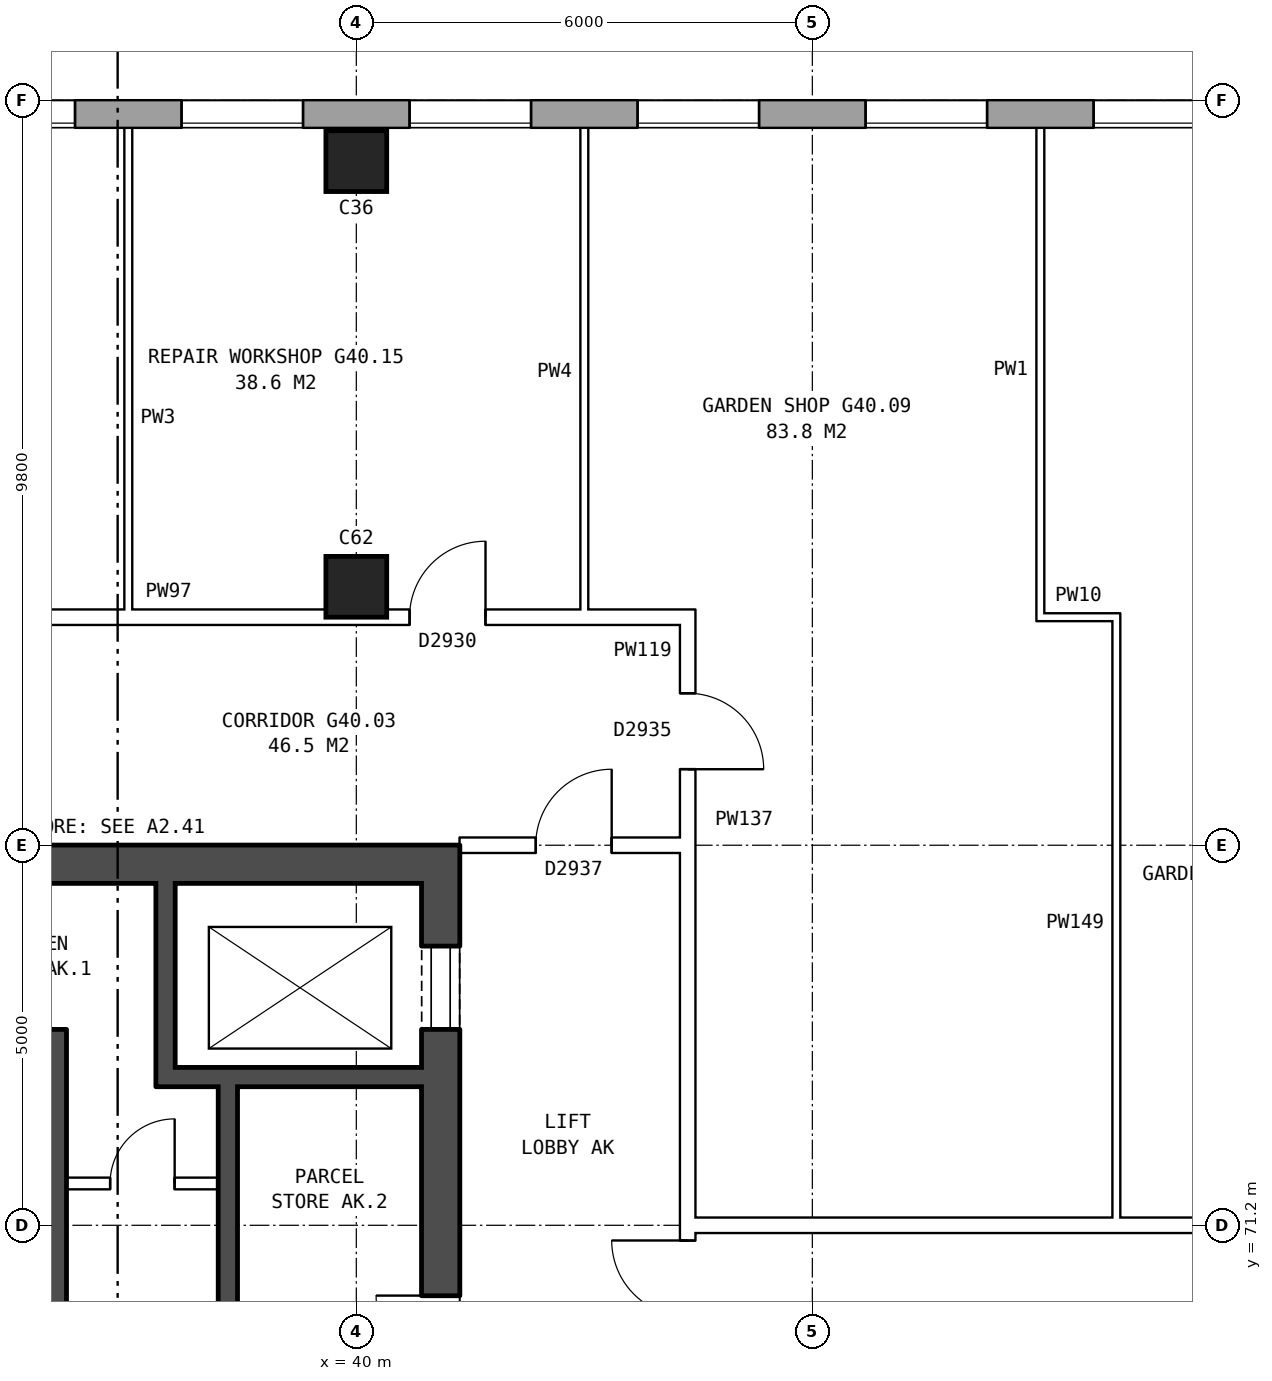
"""IFC4 building model, lengths in metres.
Left out: names, types, materials, properties, quantities, classifications, styles, units other than length and angle.
Written with IfcOpenShell. Run it as: python <this file> out.ifc"""

import sys

from ifc_helpers import new_model, si_unit, direction, frame, frame_2d, origin, origin_2d, place, context, subcontext, project, spatial, rectangle, extrude, element, fill, save


model = new_model("IFC4")
c1 = context("Model", 3, precision=1e-05, world=origin(), true_north=direction((0.0, 1.0)))
c2 = subcontext(c1, "Body", "Model", "MODEL_VIEW")
j1 = project(units=[si_unit("LENGTHUNIT", "METRE"), si_unit("PLANEANGLEUNIT", "RADIAN")], contexts=[c1])
p1 = place(None, origin())
s1 = spatial("IfcSite", under=j1, at=p1, CompositionType="ELEMENT")
p2 = place(p1, origin())
s2 = spatial("IfcBuilding", under=s1, at=p2, CompositionType="ELEMENT")
p3 = place(p2, frame((0.0, 0.0, 142.3)))
s3 = spatial("IfcBuildingStorey", under=s2, at=p3, CompositionType="ELEMENT", Elevation=142.3)
for number, where, z_axis, x_axis in (
    (1, (40.0, 79.6, 0.0), (0.0, 0.0, 1.0), (1.0, 0.0, 0.0)),
    (2, (40.0, 85.2, 0.0), (0.0, 0.0, 1.0), (1.0, 0.0, 0.0)),
):
    element("IfcColumn", number, at=place(p3, frame(where, z_axis=z_axis, x_axis=x_axis)), inside=s3, PredefinedType="COLUMN", context=c2, shape_type="SweptSolid", body=[
        extrude(rectangle(XDim=0.8, YDim=0.8, at=origin_2d()), origin(), (0.0, 0.0, 1.0), 5.6),
    ])
p4 = place(p3, frame((72.925, 85.82, 0.0), z_axis=(0.0, 0.0, 1.0), x_axis=(-1.0, 0.0, 0.0)))
e3 = element("IfcWall", 3, at=p4, inside=s3, PredefinedType="STANDARD", context=c2, shape_type="SweptSolid", body=[
    extrude(rectangle(XDim=41.351, YDim=0.36, at=frame_2d((20.675, 0.0))), origin(), (0.0, 0.0, 1.0), 5.6),
])
p5 = place(p4, frame((0.625, 0.0, 0.15)))
e4 = element("IfcOpeningElement", 4, at=p5, cuts=e3, PredefinedType="OPENING", context=c2, shape_type="SweptSolid", body=[
    extrude(rectangle(XDim=1.6, YDim=2.4, at=frame_2d((0.8, 1.2))), frame((0.0, 0.19, 0.0), z_axis=(0.0, -1.0, 0.0), x_axis=(1.0, 0.0, 0.0)), (0.0, 0.0, 1.0), 0.38),
])
p6 = place(p4, frame((3.625, 0.0, 0.15)))
e5 = element("IfcOpeningElement", 5, at=p6, cuts=e3, PredefinedType="OPENING", context=c2, shape_type="SweptSolid", body=[
    extrude(rectangle(XDim=1.6, YDim=2.4, at=frame_2d((0.8, 1.2))), frame((0.0, 0.19, 0.0), z_axis=(0.0, -1.0, 0.0), x_axis=(1.0, 0.0, 0.0)), (0.0, 0.0, 1.0), 0.38),
])
p7 = place(p4, frame((6.625, 0.0, 0.15)))
e6 = element("IfcOpeningElement", 6, at=p7, cuts=e3, PredefinedType="OPENING", context=c2, shape_type="SweptSolid", body=[
    extrude(rectangle(XDim=1.6, YDim=2.4, at=frame_2d((0.8, 1.2))), frame((0.0, 0.19, 0.0), z_axis=(0.0, -1.0, 0.0), x_axis=(1.0, 0.0, 0.0)), (0.0, 0.0, 1.0), 0.38),
])
p8 = place(p4, frame((9.625, 0.0, 0.15)))
e7 = element("IfcOpeningElement", 7, at=p8, cuts=e3, PredefinedType="OPENING", context=c2, shape_type="SweptSolid", body=[
    extrude(rectangle(XDim=1.6, YDim=2.4, at=frame_2d((0.8, 1.2))), frame((0.0, 0.19, 0.0), z_axis=(0.0, -1.0, 0.0), x_axis=(1.0, 0.0, 0.0)), (0.0, 0.0, 1.0), 0.38),
])
p9 = place(p4, frame((12.625, 0.0, 0.15)))
e8 = element("IfcOpeningElement", 8, at=p9, cuts=e3, PredefinedType="OPENING", context=c2, shape_type="SweptSolid", body=[
    extrude(rectangle(XDim=1.6, YDim=2.4, at=frame_2d((0.8, 1.2))), frame((0.0, 0.19, 0.0), z_axis=(0.0, -1.0, 0.0), x_axis=(1.0, 0.0, 0.0)), (0.0, 0.0, 1.0), 0.38),
])
p10 = place(p4, frame((15.625, 0.0, 0.15)))
e9 = element("IfcOpeningElement", 9, at=p10, cuts=e3, PredefinedType="OPENING", context=c2, shape_type="SweptSolid", body=[
    extrude(rectangle(XDim=1.6, YDim=2.4, at=frame_2d((0.8, 1.2))), frame((0.0, 0.19, 0.0), z_axis=(0.0, -1.0, 0.0), x_axis=(1.0, 0.0, 0.0)), (0.0, 0.0, 1.0), 0.38),
])
p11 = place(p4, frame((18.625, 0.0, 0.15)))
e10 = element("IfcOpeningElement", 10, at=p11, cuts=e3, PredefinedType="OPENING", context=c2, shape_type="SweptSolid", body=[
    extrude(rectangle(XDim=1.6, YDim=2.4, at=frame_2d((0.8, 1.2))), frame((0.0, 0.19, 0.0), z_axis=(0.0, -1.0, 0.0), x_axis=(1.0, 0.0, 0.0)), (0.0, 0.0, 1.0), 0.38),
])
p12 = place(p4, frame((21.625, 0.0, 0.15)))
e11 = element("IfcOpeningElement", 11, at=p12, cuts=e3, PredefinedType="OPENING", context=c2, shape_type="SweptSolid", body=[
    extrude(rectangle(XDim=1.6, YDim=2.4, at=frame_2d((0.8, 1.2))), frame((0.0, 0.19, 0.0), z_axis=(0.0, -1.0, 0.0), x_axis=(1.0, 0.0, 0.0)), (0.0, 0.0, 1.0), 0.38),
])
p13 = place(p4, frame((24.625, 0.0, 0.15)))
e12 = element("IfcOpeningElement", 12, at=p13, cuts=e3, PredefinedType="OPENING", context=c2, shape_type="SweptSolid", body=[
    extrude(rectangle(XDim=1.6, YDim=2.4, at=frame_2d((0.8, 1.2))), frame((0.0, 0.19, 0.0), z_axis=(0.0, -1.0, 0.0), x_axis=(1.0, 0.0, 0.0)), (0.0, 0.0, 1.0), 0.38),
])
p14 = place(p4, frame((27.625, 0.0, 0.15)))
e13 = element("IfcOpeningElement", 13, at=p14, cuts=e3, PredefinedType="OPENING", context=c2, shape_type="SweptSolid", body=[
    extrude(rectangle(XDim=1.6, YDim=2.4, at=frame_2d((0.8, 1.2))), frame((0.0, 0.19, 0.0), z_axis=(0.0, -1.0, 0.0), x_axis=(1.0, 0.0, 0.0)), (0.0, 0.0, 1.0), 0.38),
])
p15 = place(p4, frame((30.625, 0.0, 0.15)))
e14 = element("IfcOpeningElement", 14, at=p15, cuts=e3, PredefinedType="OPENING", context=c2, shape_type="SweptSolid", body=[
    extrude(rectangle(XDim=1.6, YDim=2.4, at=frame_2d((0.8, 1.2))), frame((0.0, 0.19, 0.0), z_axis=(0.0, -1.0, 0.0), x_axis=(1.0, 0.0, 0.0)), (0.0, 0.0, 1.0), 0.38),
])
p16 = place(p4, frame((33.625, 0.0, 0.15)))
e15 = element("IfcOpeningElement", 15, at=p16, cuts=e3, PredefinedType="OPENING", context=c2, shape_type="SweptSolid", body=[
    extrude(rectangle(XDim=1.6, YDim=2.4, at=frame_2d((0.8, 1.2))), frame((0.0, 0.19, 0.0), z_axis=(0.0, -1.0, 0.0), x_axis=(1.0, 0.0, 0.0)), (0.0, 0.0, 1.0), 0.38),
])
p17 = place(p4, frame((36.625, 0.0, 0.15)))
e16 = element("IfcOpeningElement", 16, at=p17, cuts=e3, PredefinedType="OPENING", context=c2, shape_type="SweptSolid", body=[
    extrude(rectangle(XDim=1.6, YDim=2.4, at=frame_2d((0.8, 1.2))), frame((0.0, 0.19, 0.0), z_axis=(0.0, -1.0, 0.0), x_axis=(1.0, 0.0, 0.0)), (0.0, 0.0, 1.0), 0.38),
])
p18 = place(p3, frame((41.11, 76.2, 0.0), z_axis=(0.0, 0.0, 1.0), x_axis=(0.0, -1.0, 0.0)))
e17 = element("IfcWall", 17, at=p18, inside=s3, PredefinedType="SHEAR", context=c2, shape_type="SweptSolid", body=[
    extrude(rectangle(XDim=12.4, YDim=0.5, at=frame_2d((6.2, 0.0))), origin(), (0.0, 0.0, 1.0), 5.6),
])
p19 = place(p18, frame((1.325, 0.0, 0.0)))
e18 = element("IfcOpeningElement", 18, at=p19, cuts=e17, PredefinedType="OPENING", context=c2, shape_type="SweptSolid", body=[
    extrude(rectangle(XDim=1.1, YDim=2.1, at=frame_2d((0.55, 1.05))), frame((0.0, 0.26, 0.0), z_axis=(0.0, -1.0, 0.0), x_axis=(1.0, 0.0, 0.0)), (0.0, 0.0, 1.0), 0.52),
])
p20 = place(p18, frame((5.925, 0.0, 0.0)))
e19 = element("IfcOpeningElement", 19, at=p20, cuts=e17, PredefinedType="OPENING", context=c2, shape_type="SweptSolid", body=[
    extrude(rectangle(XDim=0.85, YDim=2.1, at=frame_2d((0.425, 1.05))), frame((0.0, 0.26, 0.0), z_axis=(0.0, -1.0, 0.0), x_axis=(1.0, 0.0, 0.0)), (0.0, 0.0, 1.0), 0.52),
])
p21 = place(p18, frame((9.9, 0.0, 0.0)))
e20 = element("IfcOpeningElement", 20, at=p21, cuts=e17, PredefinedType="OPENING", context=c2, shape_type="SweptSolid", body=[
    extrude(rectangle(XDim=1.1, YDim=2.1, at=frame_2d((0.55, 1.05))), frame((0.0, 0.26, 0.0), z_axis=(0.0, -1.0, 0.0), x_axis=(1.0, 0.0, 0.0)), (0.0, 0.0, 1.0), 0.52),
])
p22 = place(p3, frame((40.86, 75.95, 0.0), z_axis=(0.0, 0.0, 1.0), x_axis=(-1.0, 0.0, 0.0)))
e21 = element("IfcWall", 21, at=p22, inside=s3, PredefinedType="SHEAR", context=c2, shape_type="SweptSolid", body=[
    extrude(rectangle(XDim=8.0, YDim=0.5, at=frame_2d((4.0, 0.0))), origin(), (0.0, 0.0, 1.0), 5.6),
])
p23 = place(p3, frame((40.86, 73.15, 0.0), z_axis=(0.0, 0.0, 1.0), x_axis=(-1.0, 0.0, 0.0)))
e22 = element("IfcWall", 22, at=p23, inside=s3, PredefinedType="SHEAR", context=c2, shape_type="SweptSolid", body=[
    extrude(rectangle(XDim=3.495, YDim=0.25, at=frame_2d((1.748, 0.0))), origin(), (0.0, 0.0, 1.0), 5.6),
])
p24 = place(p3, frame((38.185, 71.75, 0.0), z_axis=(0.0, 0.0, 1.0), x_axis=(-1.0, 0.0, 0.0)))
e23 = element("IfcWall", 23, at=p24, inside=s3, PredefinedType="PARTITIONING", context=c2, shape_type="SweptSolid", body=[
    extrude(rectangle(XDim=2.0, YDim=0.15, at=frame_2d((1.0, 0.0))), origin(), (0.0, 0.0, 1.0), 5.6),
])
p25 = place(p24, frame((0.575, 0.0, 0.0)))
e24 = element("IfcOpeningElement", 24, at=p25, cuts=e23, PredefinedType="OPENING", context=c2, shape_type="SweptSolid", body=[
    extrude(rectangle(XDim=0.85, YDim=2.1, at=frame_2d((0.425, 1.05))), frame((0.0, 0.085, 0.0), z_axis=(0.0, -1.0, 0.0), x_axis=(1.0, 0.0, 0.0)), (0.0, 0.0, 1.0), 0.17),
])
p26 = place(p3, frame((38.31, 73.025, 0.0), z_axis=(0.0, 0.0, 1.0), x_axis=(0.0, -1.0, 0.0)))
e25 = element("IfcWall", 25, at=p26, inside=s3, PredefinedType="SHEAR", context=c2, shape_type="SweptSolid", body=[
    extrude(rectangle(XDim=6.6, YDim=0.25, at=frame_2d((3.3, 0.0))), origin(), (0.0, 0.0, 1.0), 5.6),
])
p27 = place(p3, frame((37.49, 75.7, 0.0), z_axis=(0.0, 0.0, 1.0), x_axis=(0.0, -1.0, 0.0)))
e26 = element("IfcWall", 26, at=p27, inside=s3, PredefinedType="SHEAR", context=c2, shape_type="SweptSolid", body=[
    extrude(rectangle(XDim=2.425, YDim=0.25, at=frame_2d((1.212, 0.0))), origin(), (0.0, 0.0, 1.0), 5.6),
])
p28 = place(p3, frame((36.06, 73.775, 0.0), z_axis=(0.0, 0.0, 1.0), x_axis=(0.0, -1.0, 0.0)))
e27 = element("IfcWall", 27, at=p28, inside=s3, PredefinedType="SHEAR", context=c2, shape_type="SweptSolid", body=[
    extrude(rectangle(XDim=7.35, YDim=0.25, at=frame_2d((3.675, 0.0))), origin(), (0.0, 0.0, 1.0), 5.6),
])
p29 = place(p3, frame((44.36, 63.9, 0.0), z_axis=(0.0, 0.0, 1.0), x_axis=(0.0, 1.0, 0.0)))
e28 = element("IfcWall", 28, at=p29, inside=s3, PredefinedType="PARTITIONING", context=c2, shape_type="SweptSolid", body=[
    extrude(rectangle(XDim=12.2, YDim=0.2, at=frame_2d((6.1, 0.0))), origin(), (0.0, 0.0, 1.0), 5.6),
])
p30 = place(p29, frame((5.1, 0.0, 0.0)))
e29 = element("IfcOpeningElement", 29, at=p30, cuts=e28, PredefinedType="OPENING", context=c2, shape_type="SweptSolid", body=[
    extrude(rectangle(XDim=2.0, YDim=2.1, at=frame_2d((1.0, 1.05))), frame((0.0, 0.11, 0.0), z_axis=(0.0, -1.0, 0.0), x_axis=(1.0, 0.0, 0.0)), (0.0, 0.0, 1.0), 0.22),
])
p31 = place(p3, frame((44.36, 71.2, 0.0), z_axis=(0.0, 0.0, 1.0), x_axis=(1.0, 0.0, 0.0)))
e30 = element("IfcWall", 30, at=p31, inside=s3, PredefinedType="PARTITIONING", context=c2, shape_type="SweptSolid", body=[
    extrude(rectangle(XDim=19.28, YDim=0.2, at=frame_2d((9.64, 0.0))), origin(), (0.0, 0.0, 1.0), 5.6),
])
p32 = place(p31, frame((8.64, 0.0, 0.0)))
e31 = element("IfcOpeningElement", 31, at=p32, cuts=e30, PredefinedType="OPENING", context=c2, shape_type="SweptSolid", body=[
    extrude(rectangle(XDim=1.0, YDim=2.1, at=frame_2d((0.5, 1.05))), frame((0.0, 0.11, 0.0), z_axis=(0.0, -1.0, 0.0), x_axis=(1.0, 0.0, 0.0)), (0.0, 0.0, 1.0), 0.22),
])
p33 = place(p3, frame((41.36, 76.2, 0.0), z_axis=(0.0, 0.0, 1.0), x_axis=(1.0, 0.0, 0.0)))
e32 = element("IfcWall", 32, at=p33, inside=s3, PredefinedType="PARTITIONING", context=c2, shape_type="SweptSolid", body=[
    extrude(rectangle(XDim=3.1, YDim=0.2, at=frame_2d((1.55, 0.0))), origin(), (0.0, 0.0, 1.0), 5.6),
])
p34 = place(p33, frame((1.0, 0.0, 0.0)))
e33 = element("IfcOpeningElement", 33, at=p34, cuts=e32, PredefinedType="OPENING", context=c2, shape_type="SweptSolid", body=[
    extrude(rectangle(XDim=1.0, YDim=2.1, at=frame_2d((0.5, 1.05))), frame((0.0, 0.11, 0.0), z_axis=(0.0, -1.0, 0.0), x_axis=(1.0, 0.0, 0.0)), (0.0, 0.0, 1.0), 0.22),
])
p35 = place(p3, frame((28.74, 79.2, 0.0), z_axis=(0.0, 0.0, 1.0), x_axis=(1.0, 0.0, 0.0)))
e34 = element("IfcWall", 34, at=p35, inside=s3, PredefinedType="PARTITIONING", context=c2, shape_type="SweptSolid", body=[
    extrude(rectangle(XDim=15.72, YDim=0.2, at=frame_2d((7.86, 0.0))), origin(), (0.0, 0.0, 1.0), 5.6),
])
p36 = place(p35, frame((3.69, 0.0, 0.0)))
e35 = element("IfcOpeningElement", 35, at=p36, cuts=e34, PredefinedType="OPENING", context=c2, shape_type="SweptSolid", body=[
    extrude(rectangle(XDim=1.0, YDim=2.1, at=frame_2d((0.5, 1.05))), frame((0.0, 0.11, 0.0), z_axis=(0.0, -1.0, 0.0), x_axis=(1.0, 0.0, 0.0)), (0.0, 0.0, 1.0), 0.22),
])
p37 = place(p35, frame((11.96, 0.0, 0.0)))
e36 = element("IfcOpeningElement", 36, at=p37, cuts=e34, PredefinedType="OPENING", context=c2, shape_type="SweptSolid", body=[
    extrude(rectangle(XDim=1.0, YDim=2.1, at=frame_2d((0.5, 1.05))), frame((0.0, 0.11, 0.0), z_axis=(0.0, -1.0, 0.0), x_axis=(1.0, 0.0, 0.0)), (0.0, 0.0, 1.0), 0.22),
])
p38 = place(p3, frame((48.95, 79.2, 0.0), z_axis=(0.0, 0.0, 1.0), x_axis=(1.0, 0.0, 0.0)))
e37 = element("IfcWall", 37, at=p38, inside=s3, PredefinedType="PARTITIONING", context=c2, shape_type="SweptSolid", body=[
    extrude(rectangle(XDim=1.1, YDim=0.1, at=frame_2d((0.55, 0.0))), origin(), (0.0, 0.0, 1.0), 5.6),
])
for number, where, z_axis, x_axis in (
    (38, (37.0, 79.1, 0.0), (0.0, 0.0, 1.0), (0.0, 1.0, 0.0)),
    (39, (43.0, 79.1, 0.0), (0.0, 0.0, 1.0), (0.0, 1.0, 0.0)),
):
    element("IfcWall", number, at=place(p3, frame(where, z_axis=z_axis, x_axis=x_axis)), inside=s3, PredefinedType="PARTITIONING", context=c2, shape_type="SweptSolid", body=[
        extrude(rectangle(XDim=6.66, YDim=0.1, at=frame_2d((3.33, 0.0))), origin(), (0.0, 0.0, 1.0), 5.6),
    ])
p39 = place(p3, frame((44.36, 76.1, 0.0), z_axis=(0.0, 0.0, 1.0), x_axis=(0.0, 1.0, 0.0)))
e40 = element("IfcWall", 40, at=p39, inside=s3, PredefinedType="PARTITIONING", context=c2, shape_type="SweptSolid", body=[
    extrude(rectangle(XDim=3.2, YDim=0.2, at=frame_2d((1.6, 0.0))), origin(), (0.0, 0.0, 1.0), 5.6),
])
p40 = place(p39, frame((1.1, 0.0, 0.0)))
e41 = element("IfcOpeningElement", 41, at=p40, cuts=e40, PredefinedType="OPENING", context=c2, shape_type="SweptSolid", body=[
    extrude(rectangle(XDim=1.0, YDim=2.1, at=frame_2d((0.5, 1.05))), frame((0.0, 0.11, 0.0), z_axis=(0.0, -1.0, 0.0), x_axis=(1.0, 0.0, 0.0)), (0.0, 0.0, 1.0), 0.22),
])
p41 = place(p3, frame((49.0, 79.15, 0.0), z_axis=(0.0, 0.0, 1.0), x_axis=(0.0, 1.0, 0.0)))
e42 = element("IfcWall", 42, at=p41, inside=s3, PredefinedType="PARTITIONING", context=c2, shape_type="SweptSolid", body=[
    extrude(rectangle(XDim=6.61, YDim=0.1, at=frame_2d((3.305, 0.0))), origin(), (0.0, 0.0, 1.0), 5.6),
])
p42 = place(p3, frame((50.0, 71.1, 0.0), z_axis=(0.0, 0.0, 1.0), x_axis=(0.0, 1.0, 0.0)))
e43 = element("IfcWall", 43, at=p42, inside=s3, PredefinedType="PARTITIONING", context=c2, shape_type="SweptSolid", body=[
    extrude(rectangle(XDim=8.15, YDim=0.1, at=frame_2d((4.075, 0.0))), origin(), (0.0, 0.0, 1.0), 5.6),
])
p43 = place(p12, origin())
e44 = element("IfcWindow", 44, at=p43, inside=s3, PartitioningType="SINGLE_PANEL", PredefinedType="WINDOW", context=c2, shape_type="SweptSolid", body=[
    extrude(rectangle(XDim=1.6, YDim=2.4, at=frame_2d((0.8, 1.2))), frame((0.0, 0.15, 0.0), z_axis=(0.0, -1.0, 0.0), x_axis=(1.0, 0.0, 0.0)), (0.0, 0.0, 1.0), 0.06),
])
fill(e11, e44)
p44 = place(p13, origin())
e45 = element("IfcWindow", 45, at=p44, inside=s3, PartitioningType="SINGLE_PANEL", PredefinedType="WINDOW", context=c2, shape_type="SweptSolid", body=[
    extrude(rectangle(XDim=1.6, YDim=2.4, at=frame_2d((0.8, 1.2))), frame((0.0, 0.15, 0.0), z_axis=(0.0, -1.0, 0.0), x_axis=(1.0, 0.0, 0.0)), (0.0, 0.0, 1.0), 0.06),
])
fill(e12, e45)
p45 = place(p14, origin())
e46 = element("IfcWindow", 46, at=p45, inside=s3, PartitioningType="SINGLE_PANEL", PredefinedType="WINDOW", context=c2, shape_type="SweptSolid", body=[
    extrude(rectangle(XDim=1.6, YDim=2.4, at=frame_2d((0.8, 1.2))), frame((0.0, 0.15, 0.0), z_axis=(0.0, -1.0, 0.0), x_axis=(1.0, 0.0, 0.0)), (0.0, 0.0, 1.0), 0.06),
])
fill(e13, e46)
p46 = place(p15, origin())
e47 = element("IfcWindow", 47, at=p46, inside=s3, PartitioningType="SINGLE_PANEL", PredefinedType="WINDOW", context=c2, shape_type="SweptSolid", body=[
    extrude(rectangle(XDim=1.6, YDim=2.4, at=frame_2d((0.8, 1.2))), frame((0.0, 0.15, 0.0), z_axis=(0.0, -1.0, 0.0), x_axis=(1.0, 0.0, 0.0)), (0.0, 0.0, 1.0), 0.06),
])
fill(e14, e47)
p47 = place(p16, origin())
e48 = element("IfcWindow", 48, at=p47, inside=s3, PartitioningType="SINGLE_PANEL", PredefinedType="WINDOW", context=c2, shape_type="SweptSolid", body=[
    extrude(rectangle(XDim=1.6, YDim=2.4, at=frame_2d((0.8, 1.2))), frame((0.0, 0.15, 0.0), z_axis=(0.0, -1.0, 0.0), x_axis=(1.0, 0.0, 0.0)), (0.0, 0.0, 1.0), 0.06),
])
fill(e15, e48)
p48 = place(p17, origin())
e49 = element("IfcWindow", 49, at=p48, inside=s3, PartitioningType="SINGLE_PANEL", PredefinedType="WINDOW", context=c2, shape_type="SweptSolid", body=[
    extrude(rectangle(XDim=1.6, YDim=2.4, at=frame_2d((0.8, 1.2))), frame((0.0, 0.15, 0.0), z_axis=(0.0, -1.0, 0.0), x_axis=(1.0, 0.0, 0.0)), (0.0, 0.0, 1.0), 0.06),
])
fill(e16, e49)
p49 = place(p19, origin())
e50 = element("IfcDoor", 50, at=p49, inside=s3, OperationType="DOUBLE_DOOR_SLIDING", PredefinedType="DOOR", context=c2, shape_type="SweptSolid", body=[
    extrude(rectangle(XDim=1.1, YDim=2.1, at=frame_2d((0.55, 1.05))), frame((0.0, -0.185, 0.0), z_axis=(0.0, -1.0, 0.0), x_axis=(1.0, 0.0, 0.0)), (0.0, 0.0, 1.0), 0.05),
])
fill(e18, e50)
p50 = place(p20, frame((0.85, 0.0, 0.0), z_axis=(0.0, 0.0, 1.0), x_axis=(-1.0, 0.0, 0.0)))
e51 = element("IfcDoor", 51, at=p50, inside=s3, OperationType="SINGLE_SWING_RIGHT", PredefinedType="DOOR", context=c2, shape_type="SweptSolid", body=[
    extrude(rectangle(XDim=0.85, YDim=2.1, at=frame_2d((0.425, 1.05))), frame((0.0, 0.235, 0.0), z_axis=(0.0, -1.0, 0.0), x_axis=(1.0, 0.0, 0.0)), (0.0, 0.0, 1.0), 0.05),
])
fill(e19, e51)
p51 = place(p25, frame((0.85, 0.0, 0.0), z_axis=(0.0, 0.0, 1.0), x_axis=(-1.0, 0.0, 0.0)))
e52 = element("IfcDoor", 52, at=p51, inside=s3, OperationType="SINGLE_SWING_RIGHT", PredefinedType="DOOR", context=c2, shape_type="SweptSolid", body=[
    extrude(rectangle(XDim=0.85, YDim=2.1, at=frame_2d((0.425, 1.05))), frame((0.0, 0.025, 0.0), z_axis=(0.0, -1.0, 0.0), x_axis=(1.0, 0.0, 0.0)), (0.0, 0.0, 1.0), 0.05),
])
fill(e24, e52)
p52 = place(p30, origin())
e53 = element("IfcDoor", 53, at=p52, inside=s3, OperationType="DOUBLE_DOOR_SINGLE_SWING", PredefinedType="DOOR", context=c2, shape_type="SweptSolid", body=[
    extrude(rectangle(XDim=2.0, YDim=2.1, at=frame_2d((1.0, 1.05))), frame((0.0, 0.025, 0.0), z_axis=(0.0, -1.0, 0.0), x_axis=(1.0, 0.0, 0.0)), (0.0, 0.0, 1.0), 0.05),
])
fill(e29, e53)
p53 = place(p34, origin())
e54 = element("IfcDoor", 54, at=p53, inside=s3, OperationType="SINGLE_SWING_RIGHT", PredefinedType="DOOR", context=c2, shape_type="SweptSolid", body=[
    extrude(rectangle(XDim=1.0, YDim=2.1, at=frame_2d((0.5, 1.05))), frame((0.0, 0.025, 0.0), z_axis=(0.0, -1.0, 0.0), x_axis=(1.0, 0.0, 0.0)), (0.0, 0.0, 1.0), 0.05),
])
fill(e33, e54)
p54 = place(p37, origin())
e55 = element("IfcDoor", 55, at=p54, inside=s3, OperationType="SINGLE_SWING_RIGHT", PredefinedType="DOOR", context=c2, shape_type="SweptSolid", body=[
    extrude(rectangle(XDim=1.0, YDim=2.1, at=frame_2d((0.5, 1.05))), frame((0.0, 0.025, 0.0), z_axis=(0.0, -1.0, 0.0), x_axis=(1.0, 0.0, 0.0)), (0.0, 0.0, 1.0), 0.05),
])
fill(e36, e55)
p55 = place(p40, frame((1.0, 0.0, 0.0), z_axis=(0.0, 0.0, 1.0), x_axis=(-1.0, 0.0, 0.0)))
e56 = element("IfcDoor", 56, at=p55, inside=s3, OperationType="SINGLE_SWING_RIGHT", PredefinedType="DOOR", context=c2, shape_type="SweptSolid", body=[
    extrude(rectangle(XDim=1.0, YDim=2.1, at=frame_2d((0.5, 1.05))), frame((0.0, 0.025, 0.0), z_axis=(0.0, -1.0, 0.0), x_axis=(1.0, 0.0, 0.0)), (0.0, 0.0, 1.0), 0.05),
])
fill(e41, e56)
save(model, sys.argv[1])
